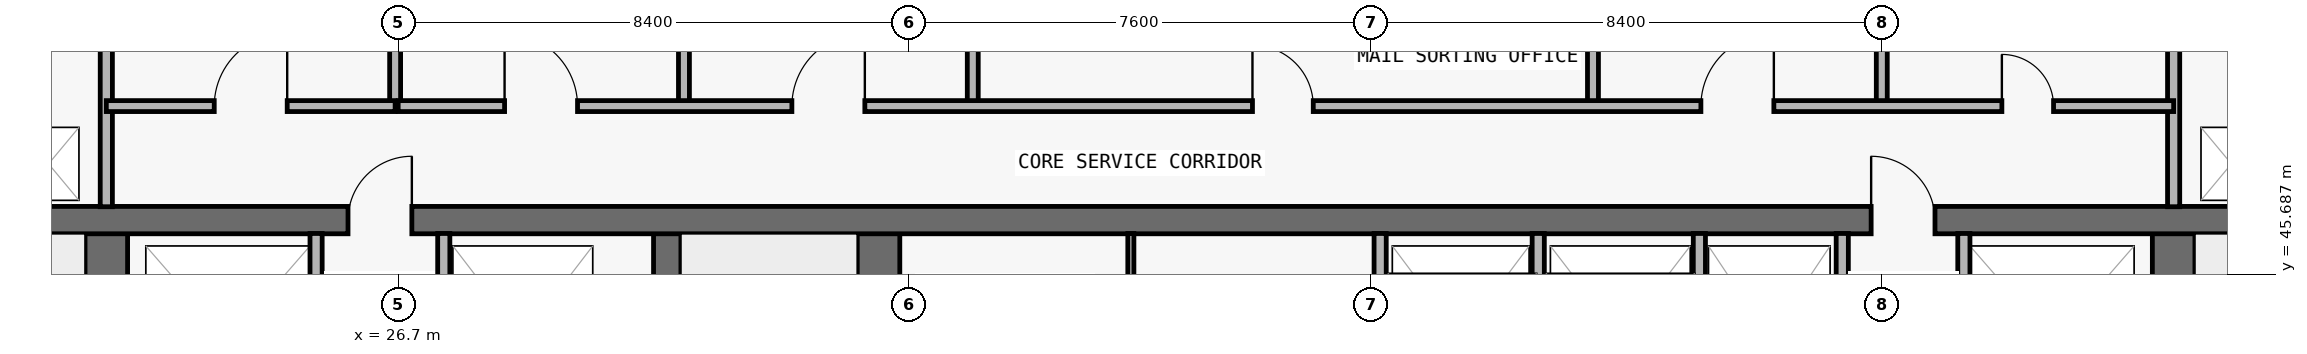
"""IFC4 building model, lengths in metres.
Left out: names, types, materials, properties, quantities, classifications, styles, units other than length and angle.
Written with IfcOpenShell. Run it as: python <this file> out.ifc"""

import sys

from ifc_helpers import new_model, si_unit, direction, frame, frame_2d, origin, place, context, subcontext, project, spatial, rectangle, extrude, element, fill, save


model = new_model("IFC4")
c1 = context("Model", 3, precision=1e-05, world=origin(), true_north=direction((0.0, 1.0)))
c2 = subcontext(c1, "Body", "Model", "MODEL_VIEW")
j1 = project(units=[si_unit("LENGTHUNIT", "METRE"), si_unit("PLANEANGLEUNIT", "RADIAN")], contexts=[c1])
p1 = place(None, origin())
s1 = spatial("IfcSite", under=j1, at=p1, CompositionType="ELEMENT")
p2 = place(p1, origin())
s2 = spatial("IfcBuilding", under=s1, at=p2, CompositionType="ELEMENT")
p3 = place(p2, frame((0.0, 0.0, 145.5)))
s3 = spatial("IfcBuildingStorey", under=s2, at=p3, CompositionType="ELEMENT", Elevation=145.5)
p4 = place(p3, frame((21.9, 36.95, 0.0), z_axis=(0.0, 0.0, 1.0), x_axis=(0.0, 1.0, 0.0)))
e1 = element("IfcWall", 1, at=p4, inside=s3, PredefinedType="SHEAR", context=c2, shape_type="SweptSolid", body=[
    extrude(rectangle(XDim=9.625, YDim=0.7, at=frame_2d((4.812, 0.0))), origin(), (0.0, 0.0, 1.0), 3.05),
])
p5 = place(p4, frame((0.6, 0.0, 0.0)))
e2 = element("IfcOpeningElement", 2, at=p5, cuts=e1, PredefinedType="OPENING", context=c2, shape_type="SweptSolid", body=[
    extrude(rectangle(XDim=1.1, YDim=2.15, at=frame_2d((0.55, 1.075))), frame((0.0, 0.36, 0.0), z_axis=(0.0, -1.0, 0.0), x_axis=(1.0, 0.0, 0.0)), (0.0, 0.0, 1.0), 0.72),
])
p6 = place(p3, frame((55.9, 36.95, 0.0), z_axis=(0.0, 0.0, 1.0), x_axis=(0.0, 1.0, 0.0)))
e3 = element("IfcWall", 3, at=p6, inside=s3, PredefinedType="SHEAR", context=c2, shape_type="SweptSolid", body=[
    extrude(rectangle(XDim=9.625, YDim=0.7, at=frame_2d((4.812, 0.0))), origin(), (0.0, 0.0, 1.0), 3.05),
])
p7 = place(p6, frame((0.6, 0.0, 0.0)))
e4 = element("IfcOpeningElement", 4, at=p7, cuts=e3, PredefinedType="OPENING", context=c2, shape_type="SweptSolid", body=[
    extrude(rectangle(XDim=1.1, YDim=2.15, at=frame_2d((0.55, 1.075))), frame((0.0, 0.36, 0.0), z_axis=(0.0, -1.0, 0.0), x_axis=(1.0, 0.0, 0.0)), (0.0, 0.0, 1.0), 0.72),
])
p8 = place(p3, frame((31.125, 36.95, 0.0), z_axis=(0.0, 0.0, 1.0), x_axis=(0.0, 1.0, 0.0)))
e5 = element("IfcWall", 5, at=p8, inside=s3, PredefinedType="SHEAR", context=c2, shape_type="SweptSolid", body=[
    extrude(rectangle(XDim=9.625, YDim=0.45, at=frame_2d((4.812, 0.0))), origin(), (0.0, 0.0, 1.0), 3.05),
])
p9 = place(p3, frame((34.6, 36.95, 0.0), z_axis=(0.0, 0.0, 1.0), x_axis=(0.0, 1.0, 0.0)))
e6 = element("IfcWall", 6, at=p9, inside=s3, PredefinedType="SHEAR", context=c2, shape_type="SweptSolid", body=[
    extrude(rectangle(XDim=9.625, YDim=0.7, at=frame_2d((4.812, 0.0))), origin(), (0.0, 0.0, 1.0), 3.05),
])
p10 = place(p3, frame((18.25, 46.575, 0.0), z_axis=(0.0, 0.0, 1.0), x_axis=(1.0, 0.0, 0.0)))
e7 = element("IfcWall", 7, at=p10, inside=s3, PredefinedType="SHEAR", context=c2, shape_type="SweptSolid", body=[
    extrude(rectangle(XDim=41.3, YDim=0.45, at=frame_2d((20.65, 0.0))), origin(), (0.0, 0.0, 1.0), 3.05),
])
p11 = place(p10, frame((7.625, 0.0, 0.0)))
e8 = element("IfcOpeningElement", 8, at=p11, cuts=e7, PredefinedType="OPENING", context=c2, shape_type="SweptSolid", body=[
    extrude(rectangle(XDim=1.05, YDim=2.15, at=frame_2d((0.525, 1.075))), frame((0.0, 0.235, 0.0), z_axis=(0.0, -1.0, 0.0), x_axis=(1.0, 0.0, 0.0)), (0.0, 0.0, 1.0), 0.47),
])
p12 = place(p10, frame((32.675, 0.0, 0.0)))
e9 = element("IfcOpeningElement", 9, at=p12, cuts=e7, PredefinedType="OPENING", context=c2, shape_type="SweptSolid", body=[
    extrude(rectangle(XDim=1.05, YDim=2.15, at=frame_2d((0.525, 1.075))), frame((0.0, 0.235, 0.0), z_axis=(0.0, -1.0, 0.0), x_axis=(1.0, 0.0, 0.0)), (0.0, 0.0, 1.0), 0.47),
])
p13 = place(p3, frame((21.9, 46.795, 0.0), z_axis=(0.0, 0.0, 1.0), x_axis=(0.0, 1.0, 0.0)))
e10 = element("IfcWall", 10, at=p13, inside=s3, PredefinedType="PARTITIONING", context=c2, shape_type="SweptSolid", body=[
    extrude(rectangle(XDim=3.16, YDim=0.2, at=frame_2d((1.58, 0.0))), origin(), (0.0, 0.0, 1.0), 3.05),
])
p14 = place(p3, frame((25.35, 43.17, 0.0), z_axis=(0.0, 0.0, 1.0), x_axis=(0.0, 1.0, 0.0)))
e11 = element("IfcWall", 11, at=p14, inside=s3, PredefinedType="PARTITIONING", context=c2, shape_type="SweptSolid", body=[
    extrude(rectangle(XDim=3.185, YDim=0.2, at=frame_2d((1.593, 0.0))), origin(), (0.0, 0.0, 1.0), 3.05),
])
p15 = place(p3, frame((26.65, 48.45, 0.0), z_axis=(0.0, 0.0, 1.0), x_axis=(0.0, 1.0, 0.0)))
e12 = element("IfcWall", 12, at=p15, inside=s3, PredefinedType="PARTITIONING", context=c2, shape_type="SweptSolid", body=[
    extrude(rectangle(XDim=1.505, YDim=0.18, at=frame_2d((0.752, 0.0))), origin(), (0.0, 0.0, 1.0), 3.05),
])
p16 = place(p3, frame((27.45, 43.17, 0.0), z_axis=(0.0, 0.0, 1.0), x_axis=(0.0, 1.0, 0.0)))
e13 = element("IfcWall", 13, at=p16, inside=s3, PredefinedType="PARTITIONING", context=c2, shape_type="SweptSolid", body=[
    extrude(rectangle(XDim=3.185, YDim=0.2, at=frame_2d((1.593, 0.0))), origin(), (0.0, 0.0, 1.0), 3.05),
])
for number, where, z_axis, x_axis in (
    (14, (31.4, 48.45, 0.0), (0.0, 0.0, 1.0), (0.0, 1.0, 0.0)),
    (15, (36.15, 48.45, 0.0), (0.0, 0.0, 1.0), (0.0, 1.0, 0.0)),
):
    element("IfcWall", number, at=place(p3, frame(where, z_axis=z_axis, x_axis=x_axis)), inside=s3, PredefinedType="PARTITIONING", context=c2, shape_type="SweptSolid", body=[
        extrude(rectangle(XDim=1.505, YDim=0.18, at=frame_2d((0.752, 0.0))), origin(), (0.0, 0.0, 1.0), 3.05),
    ])
p17 = place(p3, frame((38.75, 43.17, 0.0), z_axis=(0.0, 0.0, 1.0), x_axis=(0.0, 1.0, 0.0)))
e16 = element("IfcWall", 16, at=p17, inside=s3, PredefinedType="MOVABLE", context=c2, shape_type="SweptSolid", body=[
    extrude(rectangle(XDim=3.185, YDim=0.1, at=frame_2d((1.593, 0.0))), origin(), (0.0, 0.0, 1.0), 3.05),
])
for number, where, z_axis, x_axis in (
    (17, (42.85, 43.17, 0.0), (0.0, 0.0, 1.0), (0.0, 1.0, 0.0)),
    (18, (45.45, 43.17, 0.0), (0.0, 0.0, 1.0), (0.0, 1.0, 0.0)),
):
    element("IfcWall", number, at=place(p3, frame(where, z_axis=z_axis, x_axis=x_axis)), inside=s3, PredefinedType="PARTITIONING", context=c2, shape_type="SweptSolid", body=[
        extrude(rectangle(XDim=3.185, YDim=0.2, at=frame_2d((1.593, 0.0))), origin(), (0.0, 0.0, 1.0), 3.05),
    ])
p18 = place(p3, frame((46.35, 48.45, 0.0), z_axis=(0.0, 0.0, 1.0), x_axis=(0.0, 1.0, 0.0)))
e19 = element("IfcWall", 19, at=p18, inside=s3, PredefinedType="PARTITIONING", context=c2, shape_type="SweptSolid", body=[
    extrude(rectangle(XDim=1.505, YDim=0.18, at=frame_2d((0.752, 0.0))), origin(), (0.0, 0.0, 1.0), 3.05),
])
for number, where, z_axis, x_axis in (
    (20, (48.1, 43.17, 0.0), (0.0, 0.0, 1.0), (0.0, 1.0, 0.0)),
    (21, (50.45, 43.17, 0.0), (0.0, 0.0, 1.0), (0.0, 1.0, 0.0)),
):
    element("IfcWall", number, at=place(p3, frame(where, z_axis=z_axis, x_axis=x_axis)), inside=s3, PredefinedType="PARTITIONING", context=c2, shape_type="SweptSolid", body=[
        extrude(rectangle(XDim=3.185, YDim=0.2, at=frame_2d((1.593, 0.0))), origin(), (0.0, 0.0, 1.0), 3.05),
    ])
p19 = place(p3, frame((51.1, 48.45, 0.0), z_axis=(0.0, 0.0, 1.0), x_axis=(0.0, 1.0, 0.0)))
e22 = element("IfcWall", 22, at=p19, inside=s3, PredefinedType="PARTITIONING", context=c2, shape_type="SweptSolid", body=[
    extrude(rectangle(XDim=1.505, YDim=0.18, at=frame_2d((0.752, 0.0))), origin(), (0.0, 0.0, 1.0), 3.05),
])
p20 = place(p3, frame((52.45, 43.17, 0.0), z_axis=(0.0, 0.0, 1.0), x_axis=(0.0, 1.0, 0.0)))
e23 = element("IfcWall", 23, at=p20, inside=s3, PredefinedType="PARTITIONING", context=c2, shape_type="SweptSolid", body=[
    extrude(rectangle(XDim=3.185, YDim=0.2, at=frame_2d((1.593, 0.0))), origin(), (0.0, 0.0, 1.0), 3.05),
])
p21 = place(p3, frame((55.9, 46.795, 0.0), z_axis=(0.0, 0.0, 1.0), x_axis=(0.0, 1.0, 0.0)))
e24 = element("IfcWall", 24, at=p21, inside=s3, PredefinedType="PARTITIONING", context=c2, shape_type="SweptSolid", body=[
    extrude(rectangle(XDim=3.16, YDim=0.2, at=frame_2d((1.58, 0.0))), origin(), (0.0, 0.0, 1.0), 3.05),
])
p22 = place(p3, frame((21.9, 48.45, 0.0), z_axis=(0.0, 0.0, 1.0), x_axis=(1.0, 0.0, 0.0)))
e25 = element("IfcWall", 25, at=p22, inside=s3, PredefinedType="PARTITIONING", context=c2, shape_type="SweptSolid", body=[
    extrude(rectangle(XDim=4.75, YDim=0.18, at=frame_2d((2.375, 0.0))), origin(), (0.0, 0.0, 1.0), 3.05),
])
p23 = place(p22, frame((1.775, 0.0, 0.0)))
e26 = element("IfcOpeningElement", 26, at=p23, cuts=e25, PredefinedType="OPENING", context=c2, shape_type="SweptSolid", body=[
    extrude(rectangle(XDim=1.2, YDim=2.2, at=frame_2d((0.6, 1.1))), frame((0.0, 0.1, 0.0), z_axis=(0.0, -1.0, 0.0), x_axis=(1.0, 0.0, 0.0)), (0.0, 0.0, 1.0), 0.2),
])
p24 = place(p3, frame((26.7, 48.45, 0.0), z_axis=(0.0, 0.0, 1.0), x_axis=(1.0, 0.0, 0.0)))
e27 = element("IfcWall", 27, at=p24, inside=s3, PredefinedType="PARTITIONING", context=c2, shape_type="SweptSolid", body=[
    extrude(rectangle(XDim=29.2, YDim=0.18, at=frame_2d((14.6, 0.0))), origin(), (0.0, 0.0, 1.0), 3.05),
])
p25 = place(p24, frame((1.75, 0.0, 0.0)))
e28 = element("IfcOpeningElement", 28, at=p25, cuts=e27, PredefinedType="OPENING", context=c2, shape_type="SweptSolid", body=[
    extrude(rectangle(XDim=1.2, YDim=2.2, at=frame_2d((0.6, 1.1))), frame((0.0, 0.1, 0.0), z_axis=(0.0, -1.0, 0.0), x_axis=(1.0, 0.0, 0.0)), (0.0, 0.0, 1.0), 0.2),
])
p26 = place(p24, frame((6.475, 0.0, 0.0)))
e29 = element("IfcOpeningElement", 29, at=p26, cuts=e27, PredefinedType="OPENING", context=c2, shape_type="SweptSolid", body=[
    extrude(rectangle(XDim=1.2, YDim=2.2, at=frame_2d((0.6, 1.1))), frame((0.0, 0.1, 0.0), z_axis=(0.0, -1.0, 0.0), x_axis=(1.0, 0.0, 0.0)), (0.0, 0.0, 1.0), 0.2),
])
p27 = place(p24, frame((14.05, 0.0, 0.0)))
e30 = element("IfcOpeningElement", 30, at=p27, cuts=e27, PredefinedType="OPENING", context=c2, shape_type="SweptSolid", body=[
    extrude(rectangle(XDim=1.0, YDim=2.2, at=frame_2d((0.5, 1.1))), frame((0.0, 0.1, 0.0), z_axis=(0.0, -1.0, 0.0), x_axis=(1.0, 0.0, 0.0)), (0.0, 0.0, 1.0), 0.2),
])
p28 = place(p24, frame((21.425, 0.0, 0.0)))
e31 = element("IfcOpeningElement", 31, at=p28, cuts=e27, PredefinedType="OPENING", context=c2, shape_type="SweptSolid", body=[
    extrude(rectangle(XDim=1.2, YDim=2.2, at=frame_2d((0.6, 1.1))), frame((0.0, 0.1, 0.0), z_axis=(0.0, -1.0, 0.0), x_axis=(1.0, 0.0, 0.0)), (0.0, 0.0, 1.0), 0.2),
])
p29 = place(p24, frame((26.375, 0.0, 0.0)))
e32 = element("IfcOpeningElement", 32, at=p29, cuts=e27, PredefinedType="OPENING", context=c2, shape_type="SweptSolid", body=[
    extrude(rectangle(XDim=0.85, YDim=2.1, at=frame_2d((0.425, 1.05))), frame((0.0, 0.1, 0.0), z_axis=(0.0, -1.0, 0.0), x_axis=(1.0, 0.0, 0.0)), (0.0, 0.0, 1.0), 0.2),
])
p30 = place(p11, origin())
e33 = element("IfcDoor", 33, at=p30, inside=s3, OperationType="SINGLE_SWING_RIGHT", PredefinedType="DOOR", context=c2, shape_type="SweptSolid", body=[
    extrude(rectangle(XDim=1.05, YDim=2.15, at=frame_2d((0.525, 1.075))), frame((0.0, 0.025, 0.0), z_axis=(0.0, -1.0, 0.0), x_axis=(1.0, 0.0, 0.0)), (0.0, 0.0, 1.0), 0.05),
])
fill(e8, e33)
p31 = place(p12, origin())
e34 = element("IfcDoor", 34, at=p31, inside=s3, OperationType="SINGLE_SWING_LEFT", PredefinedType="DOOR", context=c2, shape_type="SweptSolid", body=[
    extrude(rectangle(XDim=1.05, YDim=2.15, at=frame_2d((0.525, 1.075))), frame((0.0, 0.025, 0.0), z_axis=(0.0, -1.0, 0.0), x_axis=(1.0, 0.0, 0.0)), (0.0, 0.0, 1.0), 0.05),
])
fill(e9, e34)
p32 = place(p23, origin())
e35 = element("IfcDoor", 35, at=p32, inside=s3, OperationType="SINGLE_SWING_RIGHT", PredefinedType="DOOR", context=c2, shape_type="SweptSolid", body=[
    extrude(rectangle(XDim=1.2, YDim=2.2, at=frame_2d((0.6, 1.1))), frame((0.0, 0.025, 0.0), z_axis=(0.0, -1.0, 0.0), x_axis=(1.0, 0.0, 0.0)), (0.0, 0.0, 1.0), 0.05),
])
fill(e26, e35)
p33 = place(p25, origin())
e36 = element("IfcDoor", 36, at=p33, inside=s3, OperationType="SINGLE_SWING_LEFT", PredefinedType="DOOR", context=c2, shape_type="SweptSolid", body=[
    extrude(rectangle(XDim=1.2, YDim=2.2, at=frame_2d((0.6, 1.1))), frame((0.0, 0.025, 0.0), z_axis=(0.0, -1.0, 0.0), x_axis=(1.0, 0.0, 0.0)), (0.0, 0.0, 1.0), 0.05),
])
fill(e28, e36)
p34 = place(p26, origin())
e37 = element("IfcDoor", 37, at=p34, inside=s3, OperationType="SINGLE_SWING_RIGHT", PredefinedType="DOOR", context=c2, shape_type="SweptSolid", body=[
    extrude(rectangle(XDim=1.2, YDim=2.2, at=frame_2d((0.6, 1.1))), frame((0.0, 0.025, 0.0), z_axis=(0.0, -1.0, 0.0), x_axis=(1.0, 0.0, 0.0)), (0.0, 0.0, 1.0), 0.05),
])
fill(e29, e37)
p35 = place(p27, origin())
e38 = element("IfcDoor", 38, at=p35, inside=s3, OperationType="SINGLE_SWING_LEFT", PredefinedType="DOOR", context=c2, shape_type="SweptSolid", body=[
    extrude(rectangle(XDim=1.0, YDim=2.2, at=frame_2d((0.5, 1.1))), frame((0.0, 0.025, 0.0), z_axis=(0.0, -1.0, 0.0), x_axis=(1.0, 0.0, 0.0)), (0.0, 0.0, 1.0), 0.05),
])
fill(e30, e38)
p36 = place(p28, origin())
e39 = element("IfcDoor", 39, at=p36, inside=s3, OperationType="SINGLE_SWING_RIGHT", PredefinedType="DOOR", context=c2, shape_type="SweptSolid", body=[
    extrude(rectangle(XDim=1.2, YDim=2.2, at=frame_2d((0.6, 1.1))), frame((0.0, 0.025, 0.0), z_axis=(0.0, -1.0, 0.0), x_axis=(1.0, 0.0, 0.0)), (0.0, 0.0, 1.0), 0.05),
])
fill(e31, e39)
p37 = place(p29, origin())
e40 = element("IfcDoor", 40, at=p37, inside=s3, OperationType="SINGLE_SWING_LEFT", PredefinedType="DOOR", context=c2, shape_type="SweptSolid", body=[
    extrude(rectangle(XDim=0.85, YDim=2.1, at=frame_2d((0.425, 1.05))), frame((0.0, 0.025, 0.0), z_axis=(0.0, -1.0, 0.0), x_axis=(1.0, 0.0, 0.0)), (0.0, 0.0, 1.0), 0.05),
])
fill(e32, e40)
save(model, sys.argv[1])
